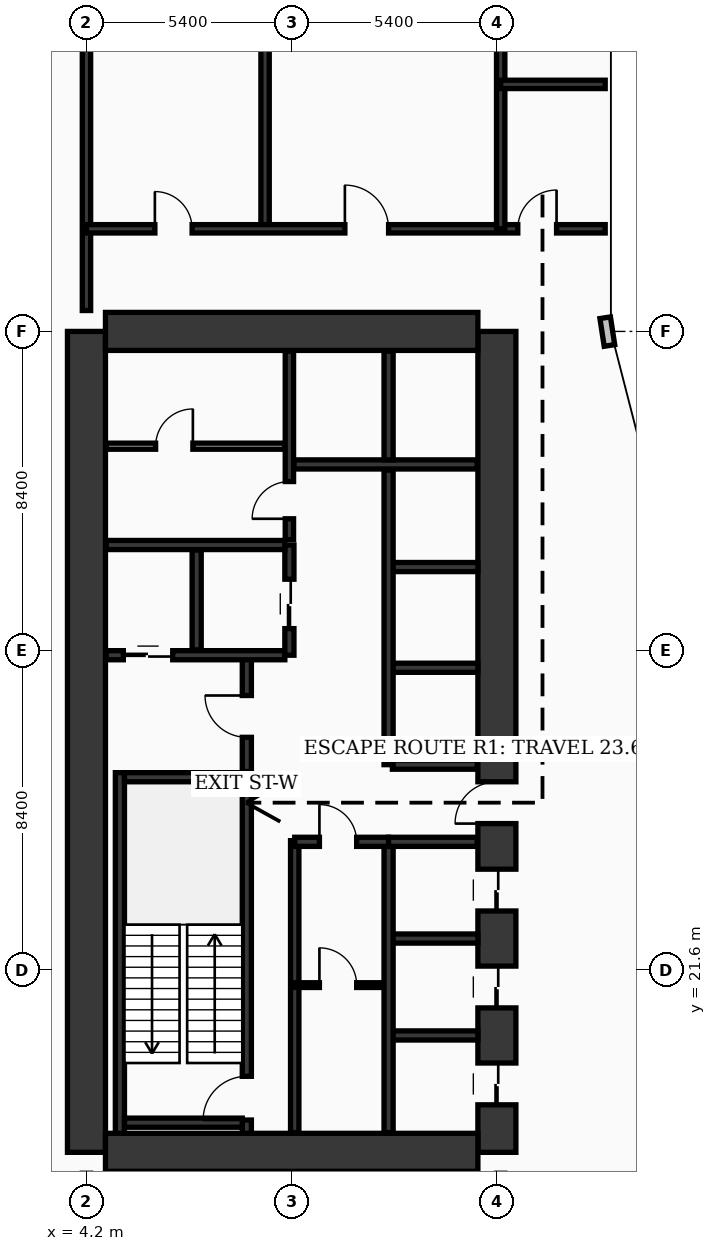
"""IFC4 building model, lengths in metres.
Left out: names, types, materials, properties, quantities, classifications, styles, units other than length and angle.
Written with IfcOpenShell. Run it as: python <this file> out.ifc"""

import sys

from ifc_helpers import new_model, si_unit, direction, frame, frame_2d, origin, origin_2d, place, context, subcontext, project, spatial, rectangle, extrude, element, fill, save


model = new_model("IFC4")
c1 = context("Model", 3, precision=1e-05, world=origin(), true_north=direction((0.0, 1.0)))
c2 = subcontext(c1, "Body", "Model", "MODEL_VIEW")
j1 = project(units=[si_unit("LENGTHUNIT", "METRE"), si_unit("PLANEANGLEUNIT", "RADIAN")], contexts=[c1])
p1 = place(None, origin())
s1 = spatial("IfcSite", under=j1, at=p1, CompositionType="ELEMENT")
p2 = place(p1, origin())
s2 = spatial("IfcBuilding", under=s1, at=p2, CompositionType="ELEMENT")
p3 = place(p2, frame((0.0, 0.0, 46.0)))
s3 = spatial("IfcBuildingStorey", under=s2, at=p3, CompositionType="ELEMENT", Elevation=46.0)
p4 = place(p3, frame((4.2, 16.8, 0.0), z_axis=(0.0, 0.0, 1.0), x_axis=(0.0, 1.0, 0.0)))
e1 = element("IfcWall", 1, at=p4, inside=s3, PredefinedType="SHEAR", context=c2, shape_type="SweptSolid", body=[
    extrude(rectangle(XDim=21.6, YDim=1.0, at=frame_2d((10.8, 0.0))), origin(), (0.0, 0.0, 1.0), 4.56),
])
p5 = place(p3, frame((15.0, 16.8, 0.0), z_axis=(0.0, 0.0, 1.0), x_axis=(0.0, 1.0, 0.0)))
e2 = element("IfcWall", 2, at=p5, inside=s3, PredefinedType="SHEAR", context=c2, shape_type="SweptSolid", body=[
    extrude(rectangle(XDim=21.6, YDim=1.0, at=frame_2d((10.8, 0.0))), origin(), (0.0, 0.0, 1.0), 4.56),
])
p6 = place(p5, frame((8.65, 0.0, 0.0)))
e3 = element("IfcOpeningElement", 3, at=p6, cuts=e2, PredefinedType="OPENING", context=c2, shape_type="SweptSolid", body=[
    extrude(rectangle(XDim=1.1, YDim=2.2, at=frame_2d((0.55, 1.1))), frame((0.0, 0.51, 0.0), z_axis=(0.0, -1.0, 0.0), x_axis=(1.0, 0.0, 0.0)), (0.0, 0.0, 1.0), 1.02),
])
p7 = place(p5, frame((1.25, 0.0, 0.0)))
e4 = element("IfcOpeningElement", 4, at=p7, cuts=e2, PredefinedType="OPENING", context=c2, shape_type="SweptSolid", body=[
    extrude(rectangle(XDim=1.1, YDim=2.2, at=frame_2d((0.55, 1.1))), frame((0.0, 0.51, 0.0), z_axis=(0.0, -1.0, 0.0), x_axis=(1.0, 0.0, 0.0)), (0.0, 0.0, 1.0), 1.02),
])
p8 = place(p5, frame((3.8, 0.0, 0.0)))
e5 = element("IfcOpeningElement", 5, at=p8, cuts=e2, PredefinedType="OPENING", context=c2, shape_type="SweptSolid", body=[
    extrude(rectangle(XDim=1.1, YDim=2.2, at=frame_2d((0.55, 1.1))), frame((0.0, 0.51, 0.0), z_axis=(0.0, -1.0, 0.0), x_axis=(1.0, 0.0, 0.0)), (0.0, 0.0, 1.0), 1.02),
])
p9 = place(p5, frame((6.35, 0.0, 0.0)))
e6 = element("IfcOpeningElement", 6, at=p9, cuts=e2, PredefinedType="OPENING", context=c2, shape_type="SweptSolid", body=[
    extrude(rectangle(XDim=1.1, YDim=2.2, at=frame_2d((0.55, 1.1))), frame((0.0, 0.51, 0.0), z_axis=(0.0, -1.0, 0.0), x_axis=(1.0, 0.0, 0.0)), (0.0, 0.0, 1.0), 1.02),
])
for number, where, z_axis, x_axis in (
    (7, (4.7, 38.4, 0.0), (0.0, 0.0, 1.0), (1.0, 0.0, 0.0)),
    (8, (4.7, 16.8, 0.0), (0.0, 0.0, 1.0), (1.0, 0.0, 0.0)),
):
    element("IfcWall", number, at=place(p3, frame(where, z_axis=z_axis, x_axis=x_axis)), inside=s3, PredefinedType="SHEAR", context=c2, shape_type="SweptSolid", body=[
        extrude(rectangle(XDim=9.8, YDim=1.0, at=frame_2d((4.9, 0.0))), origin(), (0.0, 0.0, 1.0), 4.56),
    ])
p10 = place(p3, frame((5.08, 17.3, 0.0), z_axis=(0.0, 0.0, 1.0), x_axis=(0.0, 1.0, 0.0)))
e9 = element("IfcWall", 9, at=p10, inside=s3, PredefinedType="SOLIDWALL", context=c2, shape_type="SweptSolid", body=[
    extrude(rectangle(XDim=9.49, YDim=0.24, at=frame_2d((4.745, 0.0))), origin(), (0.0, 0.0, 1.0), 4.56),
])
p11 = place(p3, frame((8.42, 17.3, 0.0), z_axis=(0.0, 0.0, 1.0), x_axis=(0.0, 1.0, 0.0)))
e10 = element("IfcWall", 10, at=p11, inside=s3, PredefinedType="SOLIDWALL", context=c2, shape_type="SweptSolid", body=[
    extrude(rectangle(XDim=9.49, YDim=0.24, at=frame_2d((4.745, 0.0))), origin(), (0.0, 0.0, 1.0), 4.56),
])
p12 = place(p11, frame((0.35, 0.0, 0.0)))
e11 = element("IfcOpeningElement", 11, at=p12, cuts=e10, PredefinedType="OPENING", context=c2, shape_type="SweptSolid", body=[
    extrude(rectangle(XDim=1.15, YDim=2.2, at=frame_2d((0.575, 1.1))), frame((0.0, 0.13, 0.0), z_axis=(0.0, -1.0, 0.0), x_axis=(1.0, 0.0, 0.0)), (0.0, 0.0, 1.0), 0.26),
])
for number, where, z_axis, x_axis in (
    (12, (5.2, 17.58, 0.0), (0.0, 0.0, 1.0), (1.0, 0.0, 0.0)),
    (13, (5.2, 26.67, 0.0), (0.0, 0.0, 1.0), (1.0, 0.0, 0.0)),
):
    element("IfcWall", number, at=place(p3, frame(where, z_axis=z_axis, x_axis=x_axis)), inside=s3, PredefinedType="SOLIDWALL", context=c2, shape_type="SweptSolid", body=[
        extrude(rectangle(XDim=3.1, YDim=0.24, at=frame_2d((1.55, 0.0))), origin(), (0.0, 0.0, 1.0), 4.56),
    ])
for number, where, z_axis, x_axis in (
    (14, (12.18, 19.875, 0.0), (0.0, 0.0, 1.0), (1.0, 0.0, 0.0)),
    (15, (12.18, 22.425, 0.0), (0.0, 0.0, 1.0), (1.0, 0.0, 0.0)),
    (16, (12.18, 29.55, 0.0), (0.0, 0.0, 1.0), (1.0, 0.0, 0.0)),
    (17, (12.18, 32.2, 0.0), (0.0, 0.0, 1.0), (1.0, 0.0, 0.0)),
):
    element("IfcWall", number, at=place(p3, frame(where, z_axis=z_axis, x_axis=x_axis)), inside=s3, PredefinedType="SOLIDWALL", context=c2, shape_type="SweptSolid", body=[
        extrude(rectangle(XDim=2.32, YDim=0.24, at=frame_2d((1.16, 0.0))), origin(), (0.0, 0.0, 1.0), 4.56),
    ])
p13 = place(p3, frame((16.55, 45.6, 0.0), z_axis=(0.0, 0.0, 1.0), x_axis=(1.0, 0.0, 0.0)))
e18 = element("IfcColumn", 18, at=p13, inside=s3, PredefinedType="COLUMN", context=c2, shape_type="SweptSolid", body=[
    extrude(rectangle(XDim=1.35, YDim=1.35, at=origin_2d()), origin(), (0.0, 0.0, 1.0), 4.56),
])
p14 = place(p3, frame((17.962, 38.03, 0.0), z_axis=(0.0, 0.0, 1.0), x_axis=(-0.15141125477, 0.988470855377, 0.0)))
e19 = element("IfcWall", 19, at=p14, inside=s3, PredefinedType="SOLIDWALL", context=c2, shape_type="SweptSolid", body=[
    extrude(rectangle(XDim=0.739, YDim=0.28, at=frame_2d((0.369, 0.0))), origin(), (0.0, 0.0, 1.0), 4.56),
])
p15 = place(p3, frame((8.42, 26.82, 0.0), z_axis=(0.0, 0.0, 1.0), x_axis=(0.0, 1.0, 0.0)))
e20 = element("IfcWall", 20, at=p15, inside=s3, PredefinedType="SOLIDWALL", context=c2, shape_type="SweptSolid", body=[
    extrude(rectangle(XDim=3.0, YDim=0.24, at=frame_2d((1.5, 0.0))), origin(), (0.0, 0.0, 1.0), 4.56),
])
p16 = place(p15, frame((0.9, 0.0, 0.0)))
e21 = element("IfcOpeningElement", 21, at=p16, cuts=e20, PredefinedType="OPENING", context=c2, shape_type="SweptSolid", body=[
    extrude(rectangle(XDim=1.1, YDim=2.2, at=frame_2d((0.55, 1.1))), frame((0.0, 0.13, 0.0), z_axis=(0.0, -1.0, 0.0), x_axis=(1.0, 0.0, 0.0)), (0.0, 0.0, 1.0), 0.26),
])
p17 = place(p3, frame((4.72, 29.88, 0.0), z_axis=(0.0, 0.0, 1.0), x_axis=(1.0, 0.0, 0.0)))
e22 = element("IfcWall", 22, at=p17, inside=s3, PredefinedType="SOLIDWALL", context=c2, shape_type="SweptSolid", body=[
    extrude(rectangle(XDim=4.7, YDim=0.24, at=frame_2d((2.35, 0.0))), origin(), (0.0, 0.0, 1.0), 4.56),
])
p18 = place(p17, frame((0.45, 0.0, 0.0)))
e23 = element("IfcOpeningElement", 23, at=p18, cuts=e22, PredefinedType="OPENING", context=c2, shape_type="SweptSolid", body=[
    extrude(rectangle(XDim=1.3, YDim=2.35, at=frame_2d((0.65, 1.175))), frame((0.0, 0.13, 0.0), z_axis=(0.0, -1.0, 0.0), x_axis=(1.0, 0.0, 0.0)), (0.0, 0.0, 1.0), 0.26),
])
p19 = place(p3, frame((7.1, 30.02, 0.0), z_axis=(0.0, 0.0, 1.0), x_axis=(0.0, 1.0, 0.0)))
e24 = element("IfcWall", 24, at=p19, inside=s3, PredefinedType="SOLIDWALL", context=c2, shape_type="SweptSolid", body=[
    extrude(rectangle(XDim=2.63, YDim=0.24, at=frame_2d((1.315, 0.0))), origin(), (0.0, 0.0, 1.0), 4.56),
])
p20 = place(p3, frame((9.54, 29.88, 0.0), z_axis=(0.0, 0.0, 1.0), x_axis=(0.0, 1.0, 0.0)))
e25 = element("IfcWall", 25, at=p20, inside=s3, PredefinedType="SOLIDWALL", context=c2, shape_type="SweptSolid", body=[
    extrude(rectangle(XDim=2.9, YDim=0.24, at=frame_2d((1.45, 0.0))), origin(), (0.0, 0.0, 1.0), 4.56),
])
p21 = place(p20, frame((0.7, 0.0, 0.0)))
e26 = element("IfcOpeningElement", 26, at=p21, cuts=e25, PredefinedType="OPENING", context=c2, shape_type="SweptSolid", body=[
    extrude(rectangle(XDim=1.3, YDim=2.35, at=frame_2d((0.65, 1.175))), frame((0.0, 0.13, 0.0), z_axis=(0.0, -1.0, 0.0), x_axis=(1.0, 0.0, 0.0)), (0.0, 0.0, 1.0), 0.26),
])
p22 = place(p3, frame((4.72, 32.78, 0.0), z_axis=(0.0, 0.0, 1.0), x_axis=(1.0, 0.0, 0.0)))
e27 = element("IfcWall", 27, at=p22, inside=s3, PredefinedType="SOLIDWALL", context=c2, shape_type="SweptSolid", body=[
    extrude(rectangle(XDim=4.7, YDim=0.24, at=frame_2d((2.35, 0.0))), origin(), (0.0, 0.0, 1.0), 4.56),
])
p23 = place(p3, frame((9.68, 17.32, 0.0), z_axis=(0.0, 0.0, 1.0), x_axis=(0.0, 1.0, 0.0)))
e28 = element("IfcWall", 28, at=p23, inside=s3, PredefinedType="SOLIDWALL", context=c2, shape_type="SweptSolid", body=[
    extrude(rectangle(XDim=7.68, YDim=0.22, at=frame_2d((3.84, 0.0))), origin(), (0.0, 0.0, 1.0), 4.56),
])
p24 = place(p3, frame((4.72, 35.38, 0.0), z_axis=(0.0, 0.0, 1.0), x_axis=(1.0, 0.0, 0.0)))
e29 = element("IfcWall", 29, at=p24, inside=s3, PredefinedType="PARTITIONING", context=c2, shape_type="SweptSolid", body=[
    extrude(rectangle(XDim=4.7, YDim=0.16, at=frame_2d((2.35, 0.0))), origin(), (0.0, 0.0, 1.0), 4.56),
])
p25 = place(p24, frame((1.3, 0.0, 0.0)))
e30 = element("IfcOpeningElement", 30, at=p25, cuts=e29, PredefinedType="OPENING", context=c2, shape_type="SweptSolid", body=[
    extrude(rectangle(XDim=0.98, YDim=2.15, at=frame_2d((0.49, 1.075))), frame((0.0, 0.09, 0.0), z_axis=(0.0, -1.0, 0.0), x_axis=(1.0, 0.0, 0.0)), (0.0, 0.0, 1.0), 0.18),
])
p26 = place(p3, frame((9.54, 32.92, 0.0), z_axis=(0.0, 0.0, 1.0), x_axis=(0.0, 1.0, 0.0)))
e31 = element("IfcWall", 31, at=p26, inside=s3, PredefinedType="SOLIDWALL", context=c2, shape_type="SweptSolid", body=[
    extrude(rectangle(XDim=4.96, YDim=0.22, at=frame_2d((2.48, 0.0))), origin(), (0.0, 0.0, 1.0), 4.56),
])
p27 = place(p26, frame((0.55, 0.0, 0.0)))
e32 = element("IfcOpeningElement", 32, at=p27, cuts=e31, PredefinedType="OPENING", context=c2, shape_type="SweptSolid", body=[
    extrude(rectangle(XDim=0.98, YDim=2.15, at=frame_2d((0.49, 1.075))), frame((0.0, 0.12, 0.0), z_axis=(0.0, -1.0, 0.0), x_axis=(1.0, 0.0, 0.0)), (0.0, 0.0, 1.0), 0.24),
])
p28 = place(p3, frame((9.68, 21.2, 0.0), z_axis=(0.0, 0.0, 1.0), x_axis=(1.0, 0.0, 0.0)))
e33 = element("IfcWall", 33, at=p28, inside=s3, PredefinedType="PARTITIONING", context=c2, shape_type="SweptSolid", body=[
    extrude(rectangle(XDim=2.47, YDim=0.125, at=frame_2d((1.235, 0.0))), origin(), (0.0, 0.0, 1.0), 4.56),
])
p29 = place(p28, frame((0.65, 0.0, 0.0)))
e34 = element("IfcOpeningElement", 34, at=p29, cuts=e33, PredefinedType="OPENING", context=c2, shape_type="SweptSolid", body=[
    extrude(rectangle(XDim=0.98, YDim=2.15, at=frame_2d((0.49, 1.075))), frame((0.0, 0.073, 0.0), z_axis=(0.0, -1.0, 0.0), x_axis=(1.0, 0.0, 0.0)), (0.0, 0.0, 1.0), 0.145),
])
p30 = place(p3, frame((12.15, 17.32, 0.0), z_axis=(0.0, 0.0, 1.0), x_axis=(0.0, 1.0, 0.0)))
e35 = element("IfcWall", 35, at=p30, inside=s3, PredefinedType="SOLIDWALL", context=c2, shape_type="SweptSolid", body=[
    extrude(rectangle(XDim=7.65, YDim=0.24, at=frame_2d((3.825, 0.0))), origin(), (0.0, 0.0, 1.0), 4.56),
])
p31 = place(p3, frame((9.68, 24.97, 0.0), z_axis=(0.0, 0.0, 1.0), x_axis=(1.0, 0.0, 0.0)))
e36 = element("IfcWall", 36, at=p31, inside=s3, PredefinedType="SOLIDWALL", context=c2, shape_type="SweptSolid", body=[
    extrude(rectangle(XDim=2.47, YDim=0.24, at=frame_2d((1.235, 0.0))), origin(), (0.0, 0.0, 1.0), 4.56),
])
p32 = place(p31, frame((0.65, 0.0, 0.0)))
e37 = element("IfcOpeningElement", 37, at=p32, cuts=e36, PredefinedType="OPENING", context=c2, shape_type="SweptSolid", body=[
    extrude(rectangle(XDim=0.98, YDim=2.15, at=frame_2d((0.49, 1.075))), frame((0.0, 0.13, 0.0), z_axis=(0.0, -1.0, 0.0), x_axis=(1.0, 0.0, 0.0)), (0.0, 0.0, 1.0), 0.26),
])
p33 = place(p3, frame((12.15, 24.97, 0.0), z_axis=(0.0, 0.0, 1.0), x_axis=(1.0, 0.0, 0.0)))
e38 = element("IfcWall", 38, at=p33, inside=s3, PredefinedType="SOLIDWALL", context=c2, shape_type="SweptSolid", body=[
    extrude(rectangle(XDim=2.33, YDim=0.24, at=frame_2d((1.165, 0.0))), origin(), (0.0, 0.0, 1.0), 3.84),
])
p34 = place(p3, frame((12.25, 27.0, 0.0), z_axis=(0.0, 0.0, 1.0), x_axis=(1.0, 0.0, 0.0)))
e39 = element("IfcWall", 39, at=p34, inside=s3, PredefinedType="SOLIDWALL", context=c2, shape_type="SweptSolid", body=[
    extrude(rectangle(XDim=2.23, YDim=0.24, at=frame_2d((1.115, 0.0))), origin(), (0.0, 0.0, 1.0), 4.56),
])
p35 = place(p3, frame((12.15, 27.0, 0.0), z_axis=(0.0, 0.0, 1.0), x_axis=(0.0, 1.0, 0.0)))
e40 = element("IfcWall", 40, at=p35, inside=s3, PredefinedType="SOLIDWALL", context=c2, shape_type="SweptSolid", body=[
    extrude(rectangle(XDim=7.75, YDim=0.24, at=frame_2d((3.875, 0.0))), origin(), (0.0, 0.0, 1.0), 4.56),
])
p36 = place(p3, frame((9.66, 34.9, 0.0), z_axis=(0.0, 0.0, 1.0), x_axis=(1.0, 0.0, 0.0)))
e41 = element("IfcWall", 41, at=p36, inside=s3, PredefinedType="SOLIDWALL", context=c2, shape_type="SweptSolid", body=[
    extrude(rectangle(XDim=4.82, YDim=0.24, at=frame_2d((2.41, 0.0))), origin(), (0.0, 0.0, 1.0), 4.56),
])
p37 = place(p3, frame((12.15, 35.02, 0.0), z_axis=(0.0, 0.0, 1.0), x_axis=(0.0, 1.0, 0.0)))
e42 = element("IfcWall", 42, at=p37, inside=s3, PredefinedType="SOLIDWALL", context=c2, shape_type="SweptSolid", body=[
    extrude(rectangle(XDim=2.86, YDim=0.24, at=frame_2d((1.43, 0.0))), origin(), (0.0, 0.0, 1.0), 4.56),
])
p38 = place(p3, frame((4.2, 38.95, 0.0), z_axis=(0.0, 0.0, 1.0), x_axis=(0.0, 1.0, 0.0)))
e43 = element("IfcWall", 43, at=p38, inside=s3, PredefinedType="SOLIDWALL", context=c2, shape_type="SweptSolid", body=[
    extrude(rectangle(XDim=11.99, YDim=0.22, at=frame_2d((5.995, 0.0))), origin(), (0.0, 0.0, 1.0), 3.84),
])
p39 = place(p3, frame((8.9, 41.1, 0.0), z_axis=(0.0, 0.0, 1.0), x_axis=(0.0, 1.0, 0.0)))
e44 = element("IfcWall", 44, at=p39, inside=s3, PredefinedType="SOLIDWALL", context=c2, shape_type="SweptSolid", body=[
    extrude(rectangle(XDim=9.84, YDim=0.22, at=frame_2d((4.92, 0.0))), origin(), (0.0, 0.0, 1.0), 4.04),
])
p40 = place(p3, frame((4.2, 41.1, 0.0), z_axis=(0.0, 0.0, 1.0), x_axis=(1.0, 0.0, 0.0)))
e45 = element("IfcWall", 45, at=p40, inside=s3, PredefinedType="SOLIDWALL", context=c2, shape_type="SweptSolid", body=[
    extrude(rectangle(XDim=13.65, YDim=0.22, at=frame_2d((6.825, 0.0))), origin(), (0.0, 0.0, 1.0), 3.84),
])
p41 = place(p40, frame((1.8, 0.0, 0.0)))
e46 = element("IfcOpeningElement", 46, at=p41, cuts=e45, PredefinedType="OPENING", context=c2, shape_type="SweptSolid", body=[
    extrude(rectangle(XDim=0.98, YDim=2.15, at=frame_2d((0.49, 1.075))), frame((0.0, 0.12, 0.0), z_axis=(0.0, -1.0, 0.0), x_axis=(1.0, 0.0, 0.0)), (0.0, 0.0, 1.0), 0.24),
])
p42 = place(p40, frame((6.8, 0.0, 0.0)))
e47 = element("IfcOpeningElement", 47, at=p42, cuts=e45, PredefinedType="OPENING", context=c2, shape_type="SweptSolid", body=[
    extrude(rectangle(XDim=1.15, YDim=2.2, at=frame_2d((0.575, 1.1))), frame((0.0, 0.12, 0.0), z_axis=(0.0, -1.0, 0.0), x_axis=(1.0, 0.0, 0.0)), (0.0, 0.0, 1.0), 0.24),
])
p43 = place(p40, frame((11.35, 0.0, 0.0)))
e48 = element("IfcOpeningElement", 48, at=p43, cuts=e45, PredefinedType="OPENING", context=c2, shape_type="SweptSolid", body=[
    extrude(rectangle(XDim=1.02, YDim=2.2, at=frame_2d((0.51, 1.1))), frame((0.0, 0.12, 0.0), z_axis=(0.0, -1.0, 0.0), x_axis=(1.0, 0.0, 0.0)), (0.0, 0.0, 1.0), 0.24),
])
p44 = place(p3, frame((15.1, 41.1, 0.0), z_axis=(0.0, 0.0, 1.0), x_axis=(0.0, 1.0, 0.0)))
e49 = element("IfcWall", 49, at=p44, inside=s3, PredefinedType="SOLIDWALL", context=c2, shape_type="SweptSolid", body=[
    extrude(rectangle(XDim=6.7, YDim=0.22, at=frame_2d((3.35, 0.0))), origin(), (0.0, 0.0, 1.0), 3.84),
])
p45 = place(p3, frame((15.1, 44.9, 0.0), z_axis=(0.0, 0.0, 1.0), x_axis=(1.0, 0.0, 0.0)))
e50 = element("IfcWall", 50, at=p45, inside=s3, PredefinedType="SOLIDWALL", context=c2, shape_type="SweptSolid", body=[
    extrude(rectangle(XDim=2.75, YDim=0.22, at=frame_2d((1.375, 0.0))), origin(), (0.0, 0.0, 1.0), 3.84),
])
p46 = place(p16, origin())
e51 = element("IfcDoor", 51, at=p46, inside=s3, OperationType="SINGLE_SWING_RIGHT", PredefinedType="DOOR", context=c2, shape_type="SweptSolid", body=[
    extrude(rectangle(XDim=1.1, YDim=2.2, at=frame_2d((0.55, 1.1))), frame((0.0, 0.025, 0.0), z_axis=(0.0, -1.0, 0.0), x_axis=(1.0, 0.0, 0.0)), (0.0, 0.0, 1.0), 0.05),
])
fill(e21, e51)
p47 = place(p18, origin())
e52 = element("IfcDoor", 52, at=p47, inside=s3, OperationType="DOUBLE_DOOR_SLIDING", PredefinedType="DOOR", context=c2, shape_type="SweptSolid", body=[
    extrude(rectangle(XDim=1.3, YDim=2.35, at=frame_2d((0.65, 1.175))), frame((0.0, 0.025, 0.0), z_axis=(0.0, -1.0, 0.0), x_axis=(1.0, 0.0, 0.0)), (0.0, 0.0, 1.0), 0.05),
])
fill(e23, e52)
p48 = place(p21, origin())
e53 = element("IfcDoor", 53, at=p48, inside=s3, OperationType="DOUBLE_DOOR_SLIDING", PredefinedType="DOOR", context=c2, shape_type="SweptSolid", body=[
    extrude(rectangle(XDim=1.3, YDim=2.35, at=frame_2d((0.65, 1.175))), frame((0.0, 0.025, 0.0), z_axis=(0.0, -1.0, 0.0), x_axis=(1.0, 0.0, 0.0)), (0.0, 0.0, 1.0), 0.05),
])
fill(e26, e53)
p49 = place(p25, origin())
e54 = element("IfcDoor", 54, at=p49, inside=s3, OperationType="SINGLE_SWING_RIGHT", PredefinedType="DOOR", context=c2, shape_type="SweptSolid", body=[
    extrude(rectangle(XDim=0.98, YDim=2.15, at=frame_2d((0.49, 1.075))), frame((0.0, 0.025, 0.0), z_axis=(0.0, -1.0, 0.0), x_axis=(1.0, 0.0, 0.0)), (0.0, 0.0, 1.0), 0.05),
])
fill(e30, e54)
p50 = place(p27, origin())
e55 = element("IfcDoor", 55, at=p50, inside=s3, OperationType="SINGLE_SWING_LEFT", PredefinedType="DOOR", context=c2, shape_type="SweptSolid", body=[
    extrude(rectangle(XDim=0.98, YDim=2.15, at=frame_2d((0.49, 1.075))), frame((0.0, 0.025, 0.0), z_axis=(0.0, -1.0, 0.0), x_axis=(1.0, 0.0, 0.0)), (0.0, 0.0, 1.0), 0.05),
])
fill(e32, e55)
p51 = place(p29, origin())
e56 = element("IfcDoor", 56, at=p51, inside=s3, OperationType="SINGLE_SWING_LEFT", PredefinedType="DOOR", context=c2, shape_type="SweptSolid", body=[
    extrude(rectangle(XDim=0.98, YDim=2.15, at=frame_2d((0.49, 1.075))), frame((0.0, 0.025, 0.0), z_axis=(0.0, -1.0, 0.0), x_axis=(1.0, 0.0, 0.0)), (0.0, 0.0, 1.0), 0.05),
])
fill(e34, e56)
p52 = place(p32, origin())
e57 = element("IfcDoor", 57, at=p52, inside=s3, OperationType="SINGLE_SWING_LEFT", PredefinedType="DOOR", context=c2, shape_type="SweptSolid", body=[
    extrude(rectangle(XDim=0.98, YDim=2.15, at=frame_2d((0.49, 1.075))), frame((0.0, 0.025, 0.0), z_axis=(0.0, -1.0, 0.0), x_axis=(1.0, 0.0, 0.0)), (0.0, 0.0, 1.0), 0.05),
])
fill(e37, e57)
p53 = place(p41, origin())
e58 = element("IfcDoor", 58, at=p53, inside=s3, OperationType="SINGLE_SWING_LEFT", PredefinedType="DOOR", context=c2, shape_type="SweptSolid", body=[
    extrude(rectangle(XDim=0.98, YDim=2.15, at=frame_2d((0.49, 1.075))), frame((0.0, 0.025, 0.0), z_axis=(0.0, -1.0, 0.0), x_axis=(1.0, 0.0, 0.0)), (0.0, 0.0, 1.0), 0.05),
])
fill(e46, e58)
p54 = place(p42, origin())
e59 = element("IfcDoor", 59, at=p54, inside=s3, OperationType="SINGLE_SWING_LEFT", PredefinedType="DOOR", context=c2, shape_type="SweptSolid", body=[
    extrude(rectangle(XDim=1.15, YDim=2.2, at=frame_2d((0.575, 1.1))), frame((0.0, 0.025, 0.0), z_axis=(0.0, -1.0, 0.0), x_axis=(1.0, 0.0, 0.0)), (0.0, 0.0, 1.0), 0.05),
])
fill(e47, e59)
p55 = place(p43, origin())
e60 = element("IfcDoor", 60, at=p55, inside=s3, OperationType="SINGLE_SWING_RIGHT", PredefinedType="DOOR", context=c2, shape_type="SweptSolid", body=[
    extrude(rectangle(XDim=1.02, YDim=2.2, at=frame_2d((0.51, 1.1))), frame((0.0, 0.025, 0.0), z_axis=(0.0, -1.0, 0.0), x_axis=(1.0, 0.0, 0.0)), (0.0, 0.0, 1.0), 0.05),
])
fill(e48, e60)
p56 = place(p12, origin())
e61 = element("IfcDoor", 61, at=p56, inside=s3, OperationType="SINGLE_SWING_LEFT", PredefinedType="DOOR", context=c2, shape_type="SweptSolid", body=[
    extrude(rectangle(XDim=1.15, YDim=2.2, at=frame_2d((0.575, 1.1))), frame((0.0, 0.025, 0.0), z_axis=(0.0, -1.0, 0.0), x_axis=(1.0, 0.0, 0.0)), (0.0, 0.0, 1.0), 0.05),
])
fill(e11, e61)
p57 = place(p6, origin())
e62 = element("IfcDoor", 62, at=p57, inside=s3, OperationType="SINGLE_SWING_LEFT", PredefinedType="DOOR", context=c2, shape_type="SweptSolid", body=[
    extrude(rectangle(XDim=1.1, YDim=2.2, at=frame_2d((0.55, 1.1))), frame((0.0, 0.025, 0.0), z_axis=(0.0, -1.0, 0.0), x_axis=(1.0, 0.0, 0.0)), (0.0, 0.0, 1.0), 0.05),
])
fill(e3, e62)
p58 = place(p7, origin())
e63 = element("IfcDoor", 63, at=p58, inside=s3, OperationType="DOUBLE_DOOR_SLIDING", PredefinedType="DOOR", context=c2, shape_type="SweptSolid", body=[
    extrude(rectangle(XDim=1.1, YDim=2.2, at=frame_2d((0.55, 1.1))), frame((0.0, 0.025, 0.0), z_axis=(0.0, -1.0, 0.0), x_axis=(1.0, 0.0, 0.0)), (0.0, 0.0, 1.0), 0.05),
])
fill(e4, e63)
p59 = place(p8, origin())
e64 = element("IfcDoor", 64, at=p59, inside=s3, OperationType="DOUBLE_DOOR_SLIDING", PredefinedType="DOOR", context=c2, shape_type="SweptSolid", body=[
    extrude(rectangle(XDim=1.1, YDim=2.2, at=frame_2d((0.55, 1.1))), frame((0.0, 0.025, 0.0), z_axis=(0.0, -1.0, 0.0), x_axis=(1.0, 0.0, 0.0)), (0.0, 0.0, 1.0), 0.05),
])
fill(e5, e64)
p60 = place(p9, origin())
e65 = element("IfcDoor", 65, at=p60, inside=s3, OperationType="DOUBLE_DOOR_SLIDING", PredefinedType="DOOR", context=c2, shape_type="SweptSolid", body=[
    extrude(rectangle(XDim=1.1, YDim=2.2, at=frame_2d((0.55, 1.1))), frame((0.0, 0.025, 0.0), z_axis=(0.0, -1.0, 0.0), x_axis=(1.0, 0.0, 0.0)), (0.0, 0.0, 1.0), 0.05),
])
fill(e6, e65)
save(model, sys.argv[1])
